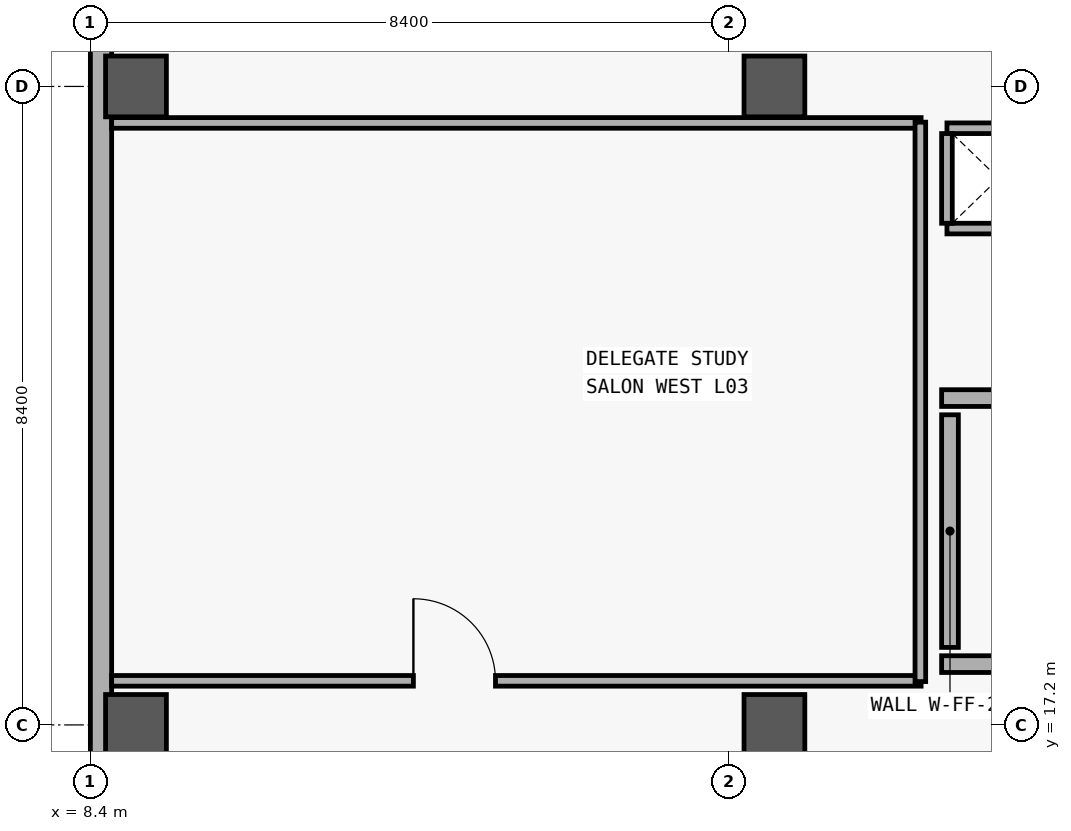
"""IFC4 building model, lengths in metres.
Left out: names, types, materials, properties, quantities, classifications, styles, units other than length and angle.
Written with IfcOpenShell. Run it as: python <this file> out.ifc"""

import sys

from ifc_helpers import new_model, si_unit, direction, frame, frame_2d, origin, origin_2d, place, context, subcontext, project, spatial, rectangle, extrude, element, fill, save


model = new_model("IFC4")
c1 = context("Model", 3, precision=1e-05, world=origin(), true_north=direction((0.0, 1.0)))
c2 = subcontext(c1, "Body", "Model", "MODEL_VIEW")
j1 = project(units=[si_unit("LENGTHUNIT", "METRE"), si_unit("PLANEANGLEUNIT", "RADIAN")], contexts=[c1])
p1 = place(None, origin())
s1 = spatial("IfcSite", under=j1, at=p1, CompositionType="ELEMENT")
p2 = place(p1, origin())
s2 = spatial("IfcBuilding", under=s1, at=p2, CompositionType="ELEMENT")
p3 = place(p2, frame((0.0, 0.0, 15.0)))
s3 = spatial("IfcBuildingStorey", under=s2, at=p3, CompositionType="ELEMENT", Elevation=15.0)
for number, where, z_axis, x_axis in (
    (1, (9.0, 17.2, 0.0), (0.0, 0.0, 1.0), (1.0, 0.0, 0.0)),
    (2, (9.0, 25.6, 0.0), (0.0, 0.0, 1.0), (1.0, 0.0, 0.0)),
    (3, (17.4, 17.2, 0.0), (0.0, 0.0, 1.0), (1.0, 0.0, 0.0)),
    (4, (17.4, 25.6, 0.0), (0.0, 0.0, 1.0), (1.0, 0.0, 0.0)),
):
    element("IfcColumn", number, at=place(p3, frame(where, z_axis=z_axis, x_axis=x_axis)), inside=s3, PredefinedType="COLUMN", context=c2, shape_type="SweptSolid", body=[
        extrude(rectangle(XDim=0.8, YDim=0.8, at=origin_2d()), origin(), (0.0, 0.0, 1.0), 4.2),
    ])
p4 = place(p3, frame((8.54, 6.0, 0.0), z_axis=(0.0, 0.0, 1.0), x_axis=(0.0, 1.0, 0.0)))
e5 = element("IfcWall", 5, at=p4, inside=s3, PredefinedType="SOLIDWALL", context=c2, shape_type="SweptSolid", body=[
    extrude(rectangle(XDim=28.0, YDim=0.28, at=frame_2d((14.0, 0.0))), origin(), (0.0, 0.0, 1.0), 3.92),
])
p5 = place(p4, frame((4.5, 0.0, 0.95)))
e6 = element("IfcOpeningElement", 6, at=p5, cuts=e5, PredefinedType="OPENING", context=c2, shape_type="SweptSolid", body=[
    extrude(rectangle(XDim=1.6, YDim=1.6, at=frame_2d((0.8, 0.8))), frame((0.0, 0.15, 0.0), z_axis=(0.0, -1.0, 0.0), x_axis=(1.0, 0.0, 0.0)), (0.0, 0.0, 1.0), 0.3),
])
p6 = place(p3, frame((19.6, 18.0, 0.0), z_axis=(0.0, 0.0, 1.0), x_axis=(1.0, 0.0, 0.0)))
e7 = element("IfcWall", 7, at=p6, inside=s3, PredefinedType="SOLIDWALL", context=c2, shape_type="SweptSolid", body=[
    extrude(rectangle(XDim=4.8, YDim=0.22, at=frame_2d((2.4, 0.0))), origin(), (0.0, 0.0, 1.0), 3.07),
])
p7 = place(p3, frame((19.6, 21.5, 0.0), z_axis=(0.0, 0.0, 1.0), x_axis=(1.0, 0.0, 0.0)))
e8 = element("IfcWall", 8, at=p7, inside=s3, PredefinedType="SOLIDWALL", context=c2, shape_type="SweptSolid", body=[
    extrude(rectangle(XDim=4.8, YDim=0.22, at=frame_2d((2.4, 0.0))), origin(), (0.0, 0.0, 1.0), 3.07),
])
p8 = place(p7, frame((2.05, 0.0, 0.0)))
e9 = element("IfcOpeningElement", 9, at=p8, cuts=e8, PredefinedType="OPENING", context=c2, shape_type="SweptSolid", body=[
    extrude(rectangle(XDim=1.25, YDim=2.2, at=frame_2d((0.625, 1.1))), frame((0.0, 0.12, 0.0), z_axis=(0.0, -1.0, 0.0), x_axis=(1.0, 0.0, 0.0)), (0.0, 0.0, 1.0), 0.24),
])
p9 = place(p3, frame((19.71, 18.22, 0.0), z_axis=(0.0, 0.0, 1.0), x_axis=(0.0, 1.0, 0.0)))
e10 = element("IfcWall", 10, at=p9, inside=s3, PredefinedType="SOLIDWALL", context=c2, shape_type="SweptSolid", body=[
    extrude(rectangle(XDim=3.06, YDim=0.22, at=frame_2d((1.53, 0.0))), origin(), (0.0, 0.0, 1.0), 3.07),
])
p10 = place(p3, frame((8.68, 17.78, 0.0), z_axis=(0.0, 0.0, 1.0), x_axis=(1.0, 0.0, 0.0)))
e11 = element("IfcWall", 11, at=p10, inside=s3, PredefinedType="PARTITIONING", context=c2, shape_type="SweptSolid", body=[
    extrude(rectangle(XDim=10.65, YDim=0.14, at=frame_2d((5.325, 0.0))), origin(), (0.0, 0.0, 1.0), 3.02),
])
p11 = place(p10, frame((3.97, 0.0, 0.0)))
e12 = element("IfcOpeningElement", 12, at=p11, cuts=e11, PredefinedType="OPENING", context=c2, shape_type="SweptSolid", body=[
    extrude(rectangle(XDim=1.08, YDim=2.25, at=frame_2d((0.54, 1.125))), frame((0.0, 0.08, 0.0), z_axis=(0.0, -1.0, 0.0), x_axis=(1.0, 0.0, 0.0)), (0.0, 0.0, 1.0), 0.16),
])
p12 = place(p3, frame((8.68, 25.12, 0.0), z_axis=(0.0, 0.0, 1.0), x_axis=(1.0, 0.0, 0.0)))
e13 = element("IfcWall", 13, at=p12, inside=s3, PredefinedType="PARTITIONING", context=c2, shape_type="SweptSolid", body=[
    extrude(rectangle(XDim=10.65, YDim=0.14, at=frame_2d((5.325, 0.0))), origin(), (0.0, 0.0, 1.0), 3.02),
])
p13 = place(p3, frame((19.32, 17.77, 0.0), z_axis=(0.0, 0.0, 1.0), x_axis=(0.0, 1.0, 0.0)))
e14 = element("IfcWall", 14, at=p13, inside=s3, PredefinedType="PARTITIONING", context=c2, shape_type="SweptSolid", body=[
    extrude(rectangle(XDim=7.36, YDim=0.14, at=frame_2d((3.68, 0.0))), origin(), (0.0, 0.0, 1.0), 3.02),
])
for number, where, z_axis, x_axis in (
    (15, (19.67, 23.73, 0.0), (0.0, 0.0, 1.0), (1.0, 0.0, 0.0)),
    (16, (21.03, 25.05, 0.0), (0.0, 0.0, 1.0), (-1.0, 0.0, 0.0)),
):
    element("IfcWall", number, at=place(p3, frame(where, z_axis=z_axis, x_axis=x_axis)), inside=s3, PredefinedType="PARTITIONING", context=c2, shape_type="SweptSolid", body=[
        extrude(rectangle(XDim=1.36, YDim=0.14, at=frame_2d((0.68, 0.0))), origin(), (0.0, 0.0, 1.0), 3.04),
    ])
p14 = place(p3, frame((19.67, 24.98, 0.0), z_axis=(0.0, 0.0, 1.0), x_axis=(0.0, -1.0, 0.0)))
e17 = element("IfcWall", 17, at=p14, inside=s3, PredefinedType="PARTITIONING", context=c2, shape_type="SweptSolid", body=[
    extrude(rectangle(XDim=1.18, YDim=0.14, at=frame_2d((0.59, 0.0))), origin(), (0.0, 0.0, 1.0), 3.04),
])
p15 = place(p11, origin())
e18 = element("IfcDoor", 18, at=p15, inside=s3, OperationType="SINGLE_SWING_LEFT", PredefinedType="DOOR", context=c2, shape_type="SweptSolid", body=[
    extrude(rectangle(XDim=1.08, YDim=2.25, at=frame_2d((0.54, 1.125))), frame((0.0, 0.025, 0.0), z_axis=(0.0, -1.0, 0.0), x_axis=(1.0, 0.0, 0.0)), (0.0, 0.0, 1.0), 0.05),
])
fill(e12, e18)
save(model, sys.argv[1])
